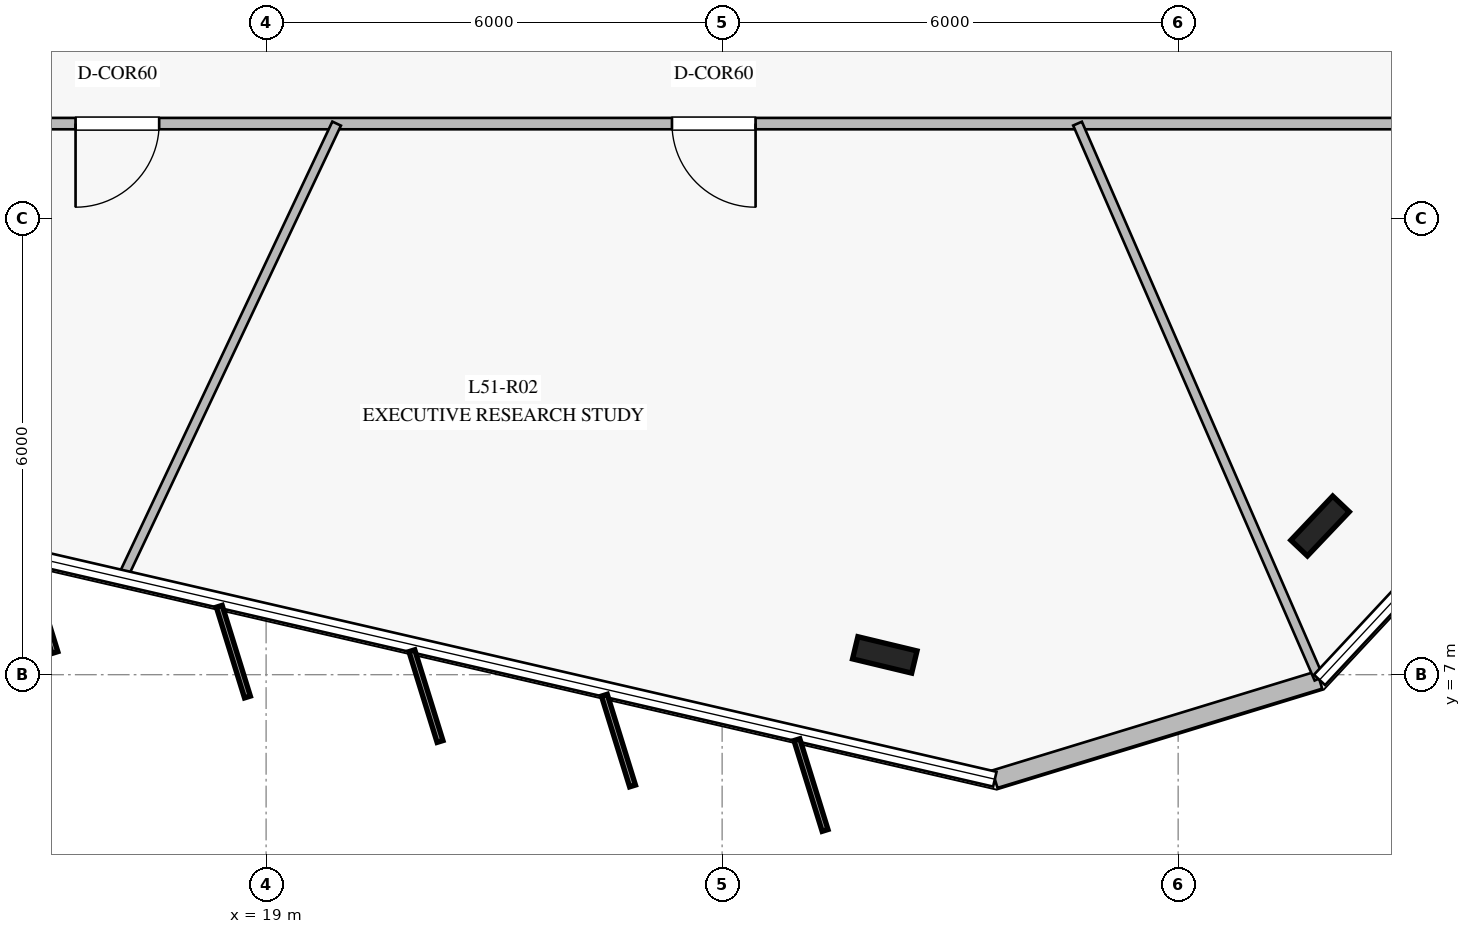
"""IFC4 building model, lengths in metres.
Left out: names, types, materials, properties, quantities, classifications, styles, units other than length and angle.
Written with IfcOpenShell. Run it as: python <this file> out.ifc"""

import sys

from ifc_helpers import new_model, si_unit, direction, frame, frame_2d, origin, origin_2d, place, context, subcontext, project, spatial, rectangle, i_section, extrude, element, fill, save


model = new_model("IFC4")
c1 = context("Model", 3, precision=1e-05, world=origin(), true_north=direction((0.0, 1.0)))
c2 = subcontext(c1, "Body", "Model", "MODEL_VIEW")
j1 = project(units=[si_unit("LENGTHUNIT", "METRE"), si_unit("PLANEANGLEUNIT", "RADIAN")], contexts=[c1])
p1 = place(None, origin())
s1 = spatial("IfcSite", under=j1, at=p1, CompositionType="ELEMENT")
p2 = place(p1, origin())
s2 = spatial("IfcBuilding", under=s1, at=p2, CompositionType="ELEMENT")
p3 = place(p2, frame((0.0, 0.0, 212.8)))
s3 = spatial("IfcBuildingStorey", under=s2, at=p3, CompositionType="ELEMENT", Elevation=212.8)
for number, where, z_axis, x_axis in (
    (1, (27.14, 7.26, 0.0), (0.0, 0.0, 1.0), (-0.972, 0.233, 0.0)),
    (2, (32.867, 8.956, 0.0), (0.0, 0.0, 1.0), (0.688, 0.725, 0.0)),
):
    element("IfcColumn", number, at=place(p3, frame(where, z_axis=z_axis, x_axis=x_axis)), inside=s3, PredefinedType="COLUMN", context=c2, shape_type="SweptSolid", body=[
        extrude(i_section(OverallWidth=0.3, OverallDepth=0.8, WebThickness=0.018, FlangeThickness=0.033, at=origin_2d()), origin(), (0.0, 0.0, 1.0), 4.0),
    ])
p4 = place(p3, frame((28.588, 5.625, 0.0), z_axis=(0.0, 0.0, 1.0), x_axis=(0.956319747301, 0.29232266577, 0.0)))
e3 = element("IfcWall", 3, at=p4, inside=s3, PredefinedType="STANDARD", context=c2, shape_type="SweptSolid", body=[
    extrude(rectangle(XDim=4.467, YDim=0.24, at=frame_2d((2.234, 0.0))), origin(), (0.0, 0.0, 1.0), 3.78),
])
p5 = place(p3, frame((36.35, 14.25, 0.0), z_axis=(0.0, 0.0, 1.0), x_axis=(-1.0, 0.0, 0.0)))
e4 = element("IfcWall", 4, at=p5, inside=s3, PredefinedType="PARTITIONING", context=c2, shape_type="SweptSolid", body=[
    extrude(rectangle(XDim=22.7, YDim=0.15, at=frame_2d((11.35, 0.0))), origin(), (0.0, 0.0, 1.0), 3.02),
])
p6 = place(p5, frame((18.757, 0.0, 0.0)))
e5 = element("IfcOpeningElement", 5, at=p6, cuts=e4, PredefinedType="OPENING", context=c2, shape_type="SweptSolid", body=[
    extrude(rectangle(XDim=1.1, YDim=2.2, at=frame_2d((0.55, 1.1))), frame((0.0, 0.085, 0.0), z_axis=(0.0, -1.0, 0.0), x_axis=(1.0, 0.0, 0.0)), (0.0, 0.0, 1.0), 0.17),
])
p7 = place(p5, frame((10.91, 0.0, 0.0)))
e6 = element("IfcOpeningElement", 6, at=p7, cuts=e4, PredefinedType="OPENING", context=c2, shape_type="SweptSolid", body=[
    extrude(rectangle(XDim=1.1, YDim=2.2, at=frame_2d((0.55, 1.1))), frame((0.0, 0.085, 0.0), z_axis=(0.0, -1.0, 0.0), x_axis=(1.0, 0.0, 0.0)), (0.0, 0.0, 1.0), 0.17),
])
p8 = place(p3, frame((19.928, 14.25, 0.0), z_axis=(0.0, 0.0, 1.0), x_axis=(-0.426706727615, -0.904390053355, 0.0)))
e7 = element("IfcWall", 7, at=p8, inside=s3, PredefinedType="PARTITIONING", context=c2, shape_type="SweptSolid", body=[
    extrude(rectangle(XDim=6.59, YDim=0.125, at=frame_2d((3.295, 0.0))), origin(), (0.0, 0.0, 1.0), 3.18),
])
p9 = place(p3, frame((29.676, 14.25, 0.0), z_axis=(0.0, 0.0, 1.0), x_axis=(0.398960400316, -0.916968155925, 0.0)))
e8 = element("IfcWall", 8, at=p9, inside=s3, PredefinedType="PARTITIONING", context=c2, shape_type="SweptSolid", body=[
    extrude(rectangle(XDim=7.963, YDim=0.125, at=frame_2d((3.981, 0.0))), origin(), (0.0, 0.0, 1.0), 3.18),
])
p10 = place(p6, origin())
e9 = element("IfcDoor", 9, at=p10, inside=s3, OperationType="SINGLE_SWING_RIGHT", PredefinedType="DOOR", context=c2, shape_type="SweptSolid", body=[
    extrude(rectangle(XDim=1.1, YDim=2.2, at=frame_2d((0.55, 1.1))), frame((0.0, 0.025, 0.0), z_axis=(0.0, -1.0, 0.0), x_axis=(1.0, 0.0, 0.0)), (0.0, 0.0, 1.0), 0.05),
])
fill(e5, e9)
p11 = place(p7, origin())
e10 = element("IfcDoor", 10, at=p11, inside=s3, OperationType="SINGLE_SWING_LEFT", PredefinedType="DOOR", context=c2, shape_type="SweptSolid", body=[
    extrude(rectangle(XDim=1.1, YDim=2.2, at=frame_2d((0.55, 1.1))), frame((0.0, 0.025, 0.0), z_axis=(0.0, -1.0, 0.0), x_axis=(1.0, 0.0, 0.0)), (0.0, 0.0, 1.0), 0.05),
])
fill(e6, e10)
save(model, sys.argv[1])
